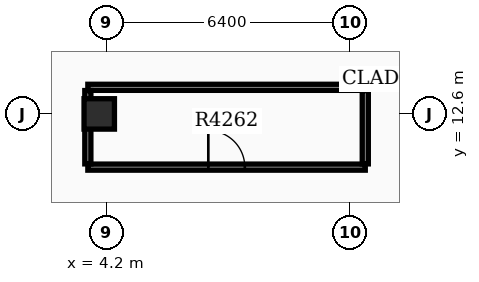
"""IFC4 building model, lengths in metres.
Left out: names, types, materials, properties, quantities, classifications, styles, units other than length and angle.
Written with IfcOpenShell. Run it as: python <this file> out.ifc"""

import sys

from ifc_helpers import new_model, si_unit, direction, frame, frame_2d, origin, origin_2d, place, context, subcontext, project, spatial, rectangle, extrude, element, fill, save


model = new_model("IFC4")
c1 = context("Model", 3, precision=1e-05, world=origin(), true_north=direction((0.0, 1.0)))
c2 = subcontext(c1, "Body", "Model", "MODEL_VIEW")
j1 = project(units=[si_unit("LENGTHUNIT", "METRE"), si_unit("PLANEANGLEUNIT", "RADIAN")], contexts=[c1])
p1 = place(None, origin())
s1 = spatial("IfcSite", under=j1, at=p1, CompositionType="ELEMENT")
p2 = place(p1, origin())
s2 = spatial("IfcBuilding", under=s1, at=p2, CompositionType="ELEMENT")
p3 = place(p2, frame((0.0, 0.0, 269.4)))
s3 = spatial("IfcBuildingStorey", under=s2, at=p3, CompositionType="ELEMENT", Elevation=269.4)
p4 = place(p3, frame((4.0, 12.6, 0.0), z_axis=(0.0, 0.0, 1.0), x_axis=(1.0, 0.0, 0.0)))
e1 = element("IfcColumn", 1, at=p4, inside=s3, PredefinedType="COLUMN", context=c2, shape_type="SweptSolid", body=[
    extrude(rectangle(XDim=0.8, YDim=0.8, at=origin_2d()), origin(), (0.0, 0.0, 1.0), 3.9),
])
p5 = place(p3, frame((3.7, 11.2, 0.0), z_axis=(0.0, 0.0, 1.0), x_axis=(1.0, 0.0, 0.0)))
e2 = element("IfcWall", 2, at=p5, inside=s3, PredefinedType="PARTITIONING", context=c2, shape_type="SweptSolid", body=[
    extrude(rectangle(XDim=7.3, YDim=0.16, at=frame_2d((3.65, 0.0))), origin(), (0.0, 0.0, 1.0), 3.17),
])
p6 = place(p5, frame((3.17, 0.0, 0.0)))
e3 = element("IfcOpeningElement", 3, at=p6, cuts=e2, PredefinedType="OPENING", context=c2, shape_type="SweptSolid", body=[
    extrude(rectangle(XDim=0.96, YDim=2.15, at=frame_2d((0.48, 1.075))), frame((0.0, 0.09, 0.0), z_axis=(0.0, -1.0, 0.0), x_axis=(1.0, 0.0, 0.0)), (0.0, 0.0, 1.0), 0.18),
])
p7 = place(p3, frame((3.7, 13.3, 0.0), z_axis=(0.0, 0.0, 1.0), x_axis=(1.0, 0.0, 0.0)))
e4 = element("IfcWall", 4, at=p7, inside=s3, PredefinedType="PARTITIONING", context=c2, shape_type="SweptSolid", body=[
    extrude(rectangle(XDim=7.3, YDim=0.16, at=frame_2d((3.65, 0.0))), origin(), (0.0, 0.0, 1.0), 3.17),
])
for number, where, z_axis, x_axis in (
    (5, (3.7, 11.285, 0.0), (0.0, 0.0, 1.0), (0.0, 1.0, 0.0)),
    (6, (11.0, 11.285, 0.0), (0.0, 0.0, 1.0), (0.0, 1.0, 0.0)),
):
    element("IfcWall", number, at=place(p3, frame(where, z_axis=z_axis, x_axis=x_axis)), inside=s3, PredefinedType="PARTITIONING", context=c2, shape_type="SweptSolid", body=[
        extrude(rectangle(XDim=1.93, YDim=0.16, at=frame_2d((0.965, 0.0))), origin(), (0.0, 0.0, 1.0), 3.17),
    ])
p8 = place(p6, origin())
e7 = element("IfcDoor", 7, at=p8, inside=s3, OperationType="SINGLE_SWING_LEFT", PredefinedType="DOOR", context=c2, shape_type="SweptSolid", body=[
    extrude(rectangle(XDim=0.96, YDim=2.15, at=frame_2d((0.48, 1.075))), frame((0.0, 0.025, 0.0), z_axis=(0.0, -1.0, 0.0), x_axis=(1.0, 0.0, 0.0)), (0.0, 0.0, 1.0), 0.05),
])
fill(e3, e7)
save(model, sys.argv[1])
